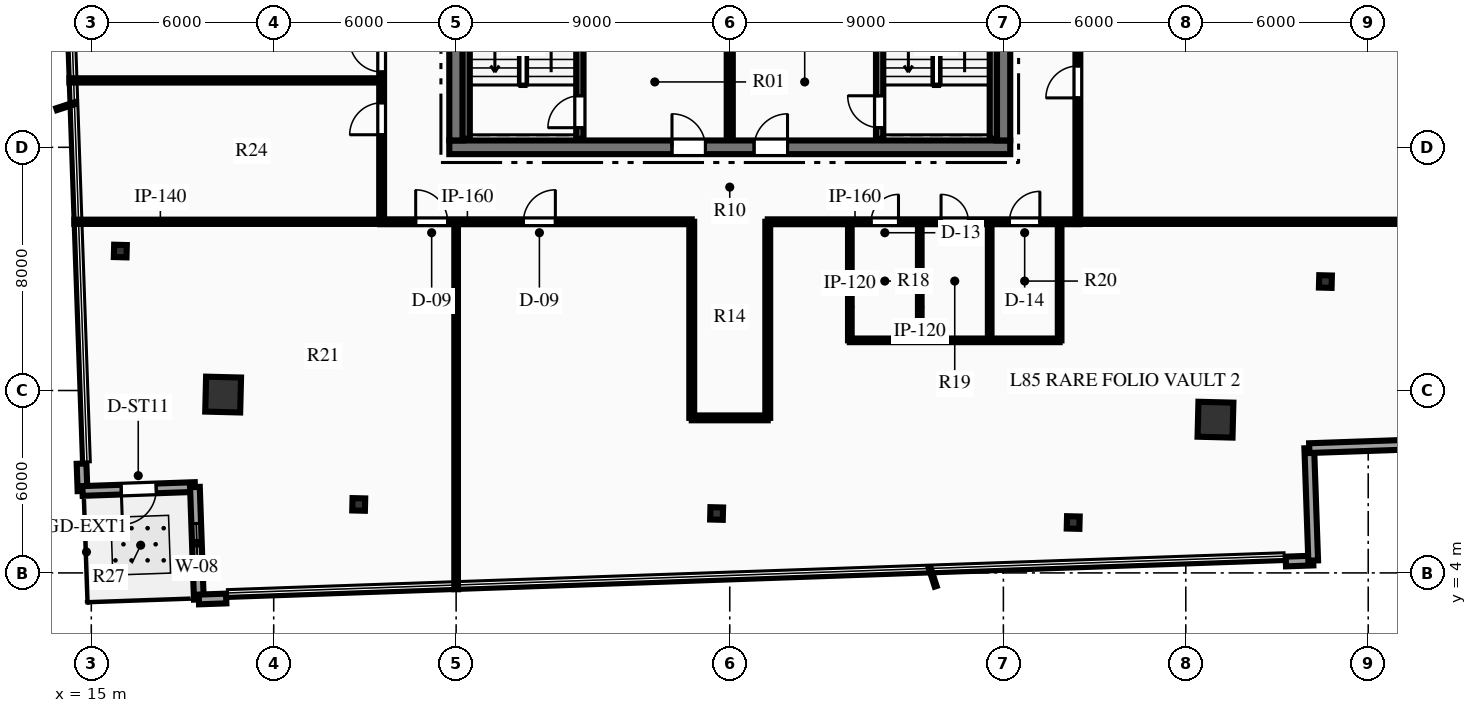
"""IFC4 building model, lengths in metres.
Left out: names, types, materials, properties, quantities, classifications, styles, units other than length and angle.
Written with IfcOpenShell. Run it as: python <this file> out.ifc"""

import sys

from ifc_helpers import new_model, si_unit, direction, frame, frame_2d, origin, origin_2d, place, context, subcontext, project, spatial, rectangle, hollow_rectangle, i_section, extrude, element, fill, save


model = new_model("IFC4")
c1 = context("Model", 3, precision=1e-05, world=origin(), true_north=direction((0.0, 1.0)))
c2 = subcontext(c1, "Body", "Model", "MODEL_VIEW")
j1 = project(units=[si_unit("LENGTHUNIT", "METRE"), si_unit("PLANEANGLEUNIT", "RADIAN")], contexts=[c1])
p1 = place(None, origin())
s1 = spatial("IfcSite", under=j1, at=p1, CompositionType="ELEMENT")
p2 = place(p1, origin())
s2 = spatial("IfcBuilding", under=s1, at=p2, CompositionType="ELEMENT")
p3 = place(p2, frame((0.0, 0.0, 336.45)))
s3 = spatial("IfcBuildingStorey", under=s2, at=p3, CompositionType="ELEMENT", Elevation=336.45)
p4 = place(p3, frame((26.775, 18.0, 0.0), z_axis=(0.0, 0.0, 1.0), x_axis=(1.0, 0.0, 0.0)))
e1 = element("IfcWall", 1, at=p4, inside=s3, PredefinedType="SHEAR", context=c2, shape_type="SweptSolid", body=[
    extrude(rectangle(XDim=18.45, YDim=0.45, at=frame_2d((9.225, 0.0))), origin(), (0.0, 0.0, 1.0), 3.75),
])
p5 = place(p4, frame((7.325, 0.0, 0.0)))
e2 = element("IfcOpeningElement", 2, at=p5, cuts=e1, PredefinedType="OPENING", context=c2, shape_type="SweptSolid", body=[
    extrude(rectangle(XDim=1.1, YDim=2.15, at=frame_2d((0.55, 1.075))), frame((0.0, 0.235, 0.0), z_axis=(0.0, -1.0, 0.0), x_axis=(1.0, 0.0, 0.0)), (0.0, 0.0, 1.0), 0.47),
])
p6 = place(p4, frame((10.025, 0.0, 0.0)))
e3 = element("IfcOpeningElement", 3, at=p6, cuts=e1, PredefinedType="OPENING", context=c2, shape_type="SweptSolid", body=[
    extrude(rectangle(XDim=1.1, YDim=2.15, at=frame_2d((0.55, 1.075))), frame((0.0, 0.235, 0.0), z_axis=(0.0, -1.0, 0.0), x_axis=(1.0, 0.0, 0.0)), (0.0, 0.0, 1.0), 0.47),
])
p7 = place(p3, frame((27.0, 18.225, 0.0), z_axis=(0.0, 0.0, 1.0), x_axis=(0.0, 1.0, 0.0)))
e4 = element("IfcWall", 4, at=p7, inside=s3, PredefinedType="SHEAR", context=c2, shape_type="SweptSolid", body=[
    extrude(rectangle(XDim=15.55, YDim=0.45, at=frame_2d((7.775, 0.0))), origin(), (0.0, 0.0, 1.0), 3.75),
])
p8 = place(p7, frame((10.015, 0.0, 0.0)))
e5 = element("IfcOpeningElement", 5, at=p8, cuts=e4, PredefinedType="OPENING", context=c2, shape_type="SweptSolid", body=[
    extrude(rectangle(XDim=1.4, YDim=2.2, at=frame_2d((0.7, 1.1))), frame((0.0, 0.235, 0.0), z_axis=(0.0, -1.0, 0.0), x_axis=(1.0, 0.0, 0.0)), (0.0, 0.0, 1.0), 0.47),
])
p9 = place(p3, frame((45.0, 18.225, 0.0), z_axis=(0.0, 0.0, 1.0), x_axis=(0.0, 1.0, 0.0)))
e6 = element("IfcWall", 6, at=p9, inside=s3, PredefinedType="SHEAR", context=c2, shape_type="SweptSolid", body=[
    extrude(rectangle(XDim=15.55, YDim=0.45, at=frame_2d((7.775, 0.0))), origin(), (0.0, 0.0, 1.0), 3.75),
])
p10 = place(p9, frame((10.015, 0.0, 0.0)))
e7 = element("IfcOpeningElement", 7, at=p10, cuts=e6, PredefinedType="OPENING", context=c2, shape_type="SweptSolid", body=[
    extrude(rectangle(XDim=1.4, YDim=2.2, at=frame_2d((0.7, 1.1))), frame((0.0, 0.235, 0.0), z_axis=(0.0, -1.0, 0.0), x_axis=(1.0, 0.0, 0.0)), (0.0, 0.0, 1.0), 0.47),
])
p11 = place(p3, frame((31.07, 18.28, 0.0), z_axis=(0.0, 0.0, 1.0), x_axis=(0.0, 1.0, 0.0)))
e8 = element("IfcWall", 8, at=p11, inside=s3, PredefinedType="SHEAR", context=c2, shape_type="SweptSolid", body=[
    extrude(rectangle(XDim=8.26, YDim=0.24, at=frame_2d((4.13, 0.0))), origin(), (0.0, 0.0, 1.0), 3.75),
])
p12 = place(p11, frame((0.365, 0.0, 0.0)))
e9 = element("IfcOpeningElement", 9, at=p12, cuts=e8, PredefinedType="OPENING", context=c2, shape_type="SweptSolid", body=[
    extrude(rectangle(XDim=1.05, YDim=2.15, at=frame_2d((0.525, 1.075))), frame((0.0, 0.13, 0.0), z_axis=(0.0, -1.0, 0.0), x_axis=(1.0, 0.0, 0.0)), (0.0, 0.0, 1.0), 0.26),
])
p13 = place(p3, frame((27.33, 18.28, 0.0), z_axis=(0.0, 0.0, 1.0), x_axis=(0.0, 1.0, 0.0)))
e10 = element("IfcWall", 10, at=p13, inside=s3, PredefinedType="SHEAR", context=c2, shape_type="SweptSolid", body=[
    extrude(rectangle(XDim=8.26, YDim=0.24, at=frame_2d((4.13, 0.0))), origin(), (0.0, 0.0, 1.0), 3.75),
])
p14 = place(p3, frame((40.93, 18.28, 0.0), z_axis=(0.0, 0.0, 1.0), x_axis=(0.0, 1.0, 0.0)))
e11 = element("IfcWall", 11, at=p14, inside=s3, PredefinedType="SHEAR", context=c2, shape_type="SweptSolid", body=[
    extrude(rectangle(XDim=8.26, YDim=0.24, at=frame_2d((4.13, 0.0))), origin(), (0.0, 0.0, 1.0), 3.75),
])
p15 = place(p14, frame((0.365, 0.0, 0.0)))
e12 = element("IfcOpeningElement", 12, at=p15, cuts=e11, PredefinedType="OPENING", context=c2, shape_type="SweptSolid", body=[
    extrude(rectangle(XDim=1.05, YDim=2.15, at=frame_2d((0.525, 1.075))), frame((0.0, 0.13, 0.0), z_axis=(0.0, -1.0, 0.0), x_axis=(1.0, 0.0, 0.0)), (0.0, 0.0, 1.0), 0.26),
])
p16 = place(p3, frame((44.67, 18.28, 0.0), z_axis=(0.0, 0.0, 1.0), x_axis=(0.0, 1.0, 0.0)))
e13 = element("IfcWall", 13, at=p16, inside=s3, PredefinedType="SHEAR", context=c2, shape_type="SweptSolid", body=[
    extrude(rectangle(XDim=8.26, YDim=0.24, at=frame_2d((4.13, 0.0))), origin(), (0.0, 0.0, 1.0), 3.75),
])
for number, where, z_axis, x_axis in (
    (14, (51.976, 9.04, 0.0), (0.0, 0.0, 1.0), (0.025, 1.0, 0.0)),
    (15, (19.336, 9.866, 0.0), (0.0, 0.0, 1.0), (0.025, 1.0, 0.0)),
):
    element("IfcColumn", number, at=place(p3, frame(where, z_axis=z_axis, x_axis=x_axis)), inside=s3, PredefinedType="COLUMN", context=c2, shape_type="SweptSolid", body=[
        extrude(hollow_rectangle(XDim=1.15, YDim=1.15, WallThickness=0.05, at=origin_2d()), origin(), (0.0, 0.0, 1.0), 3.75),
    ])
for number, where, z_axis, x_axis in (
    (16, (55.592, 13.584, 0.0), (0.0, 0.0, 1.0), (0.025, 1.0, 0.0)),
    (17, (15.955, 14.588, 0.0), (0.0, 0.0, 1.0), (0.025, 1.0, 0.0)),
    (18, (23.796, 6.252, 0.0), (0.0, 0.0, 1.0), (0.025, 1.0, 0.0)),
    (19, (35.568, 5.955, 0.0), (0.0, 0.0, 1.0), (0.025, 1.0, 0.0)),
    (20, (47.297, 5.658, 0.0), (0.0, 0.0, 1.0), (0.025, 1.0, 0.0)),
):
    element("IfcColumn", number, at=place(p3, frame(where, z_axis=z_axis, x_axis=x_axis)), inside=s3, PredefinedType="COLUMN", context=c2, shape_type="SweptSolid", body=[
        extrude(i_section(OverallWidth=0.406, OverallDepth=0.416, WebThickness=0.03, FlangeThickness=0.048, at=origin_2d()), origin(), (0.0, 0.0, 1.0), 3.75),
    ])
p17 = place(p3, frame((14.711, 6.695, 0.0), z_axis=(0.0, 0.0, 1.0), x_axis=(-0.034723889474, 0.999396943912, 0.0)))
e21 = element("IfcWall", 21, at=p17, inside=s3, PredefinedType="STANDARD", context=c2, shape_type="SweptSolid", body=[
    extrude(rectangle(XDim=0.9, YDim=0.32, at=frame_2d((0.45, 0.0))), origin(), (0.0, 0.0, 1.0), 3.49),
])
p18 = place(p3, frame((18.408, 6.824, 0.0), z_axis=(0.0, 0.0, 1.0), x_axis=(-0.999390619817, -0.034905429677, 0.0)))
e22 = element("IfcWall", 22, at=p18, inside=s3, PredefinedType="STANDARD", context=c2, shape_type="SweptSolid", body=[
    extrude(rectangle(XDim=3.7, YDim=0.32, at=frame_2d((1.85, 0.0))), origin(), (0.0, 0.0, 1.0), 3.49),
])
p19 = place(p18, frame((1.275, 0.0, 0.0)))
e23 = element("IfcOpeningElement", 23, at=p19, cuts=e22, PredefinedType="OPENING", context=c2, shape_type="SweptSolid", body=[
    extrude(rectangle(XDim=1.15, YDim=2.2, at=frame_2d((0.575, 1.1))), frame((0.0, 0.17, 0.0), z_axis=(0.0, -1.0, 0.0), x_axis=(1.0, 0.0, 0.0)), (0.0, 0.0, 1.0), 0.34),
])
p20 = place(p3, frame((18.538, 3.127, 0.0), z_axis=(0.0, 0.0, 1.0), x_axis=(-0.034905429677, 0.999390619817, 0.0)))
e24 = element("IfcWall", 24, at=p20, inside=s3, PredefinedType="STANDARD", context=c2, shape_type="SweptSolid", body=[
    extrude(rectangle(XDim=3.7, YDim=0.32, at=frame_2d((1.85, 0.0))), origin(), (0.0, 0.0, 1.0), 3.49),
])
p21 = place(p20, frame((1.2, 0.0, 0.85)))
e25 = element("IfcOpeningElement", 25, at=p21, cuts=e24, PredefinedType="OPENING", context=c2, shape_type="SweptSolid", body=[
    extrude(rectangle(XDim=1.3, YDim=1.9, at=frame_2d((0.65, 0.95))), frame((0.0, 0.17, 0.0), z_axis=(0.0, -1.0, 0.0), x_axis=(1.0, 0.0, 0.0)), (0.0, 0.0, 1.0), 0.34),
])
for number, where, z_axis, x_axis in (
    (26, (55.19, 4.406, 0.0), (0.0, 0.0, 1.0), (-0.999, -0.035, 0.0)),
    (27, (19.437, 3.158, 0.0), (0.0, 0.0, 1.0), (-0.999, -0.035, 0.0)),
):
    element("IfcWall", number, at=place(p3, frame(where, z_axis=z_axis, x_axis=x_axis)), inside=s3, PredefinedType="STANDARD", context=c2, shape_type="SweptSolid", body=[
        extrude(rectangle(XDim=0.9, YDim=0.32, at=frame_2d((0.45, 0.0))), origin(), (0.0, 0.0, 1.0), 3.49),
    ])
p22 = place(p3, frame((55.061, 8.104, 0.0), z_axis=(0.0, 0.0, 1.0), x_axis=(0.034839526044, -0.999392919439, 0.0)))
e28 = element("IfcWall", 28, at=p22, inside=s3, PredefinedType="STANDARD", context=c2, shape_type="SweptSolid", body=[
    extrude(rectangle(XDim=3.7, YDim=0.32, at=frame_2d((1.85, 0.0))), origin(), (0.0, 0.0, 1.0), 3.49),
])
p23 = place(p3, frame((58.759, 8.233, 0.0), z_axis=(0.0, 0.0, 1.0), x_axis=(-0.999390539416, -0.034907731618, 0.0)))
e29 = element("IfcWall", 29, at=p23, inside=s3, PredefinedType="STANDARD", context=c2, shape_type="SweptSolid", body=[
    extrude(rectangle(XDim=3.7, YDim=0.32, at=frame_2d((1.85, 0.0))), origin(), (0.0, 0.0, 1.0), 3.49),
])
p24 = place(p3, frame((36.0, 18.28, 0.0), z_axis=(0.0, 0.0, 1.0), x_axis=(0.0, 1.0, 0.0)))
e30 = element("IfcWall", 30, at=p24, inside=s3, PredefinedType="PARTITIONING", context=c2, shape_type="SweptSolid", body=[
    extrude(rectangle(XDim=3.77, YDim=0.2, at=frame_2d((1.885, 0.0))), origin(), (0.0, 0.0, 1.0), 3.49),
])
p25 = place(p3, frame((24.5, 15.55, 0.0), z_axis=(0.0, 0.0, 1.0), x_axis=(1.0, 0.0, 0.0)))
e31 = element("IfcWall", 31, at=p25, inside=s3, PredefinedType="PARTITIONING", context=c2, shape_type="SweptSolid", body=[
    extrude(rectangle(XDim=10.25, YDim=0.16, at=frame_2d((5.125, 0.0))), origin(), (0.0, 0.0, 1.0), 3.49),
])
p26 = place(p25, frame((1.17, 0.0, 0.0)))
e32 = element("IfcOpeningElement", 32, at=p26, cuts=e31, PredefinedType="OPENING", context=c2, shape_type="SweptSolid", body=[
    extrude(rectangle(XDim=1.05, YDim=2.15, at=frame_2d((0.525, 1.075))), frame((0.0, 0.09, 0.0), z_axis=(0.0, -1.0, 0.0), x_axis=(1.0, 0.0, 0.0)), (0.0, 0.0, 1.0), 0.18),
])
p27 = place(p25, frame((4.714, 0.0, 0.0)))
e33 = element("IfcOpeningElement", 33, at=p27, cuts=e31, PredefinedType="OPENING", context=c2, shape_type="SweptSolid", body=[
    extrude(rectangle(XDim=1.05, YDim=2.15, at=frame_2d((0.525, 1.075))), frame((0.0, 0.09, 0.0), z_axis=(0.0, -1.0, 0.0), x_axis=(1.0, 0.0, 0.0)), (0.0, 0.0, 1.0), 0.18),
])
p28 = place(p3, frame((37.25, 15.55, 0.0), z_axis=(0.0, 0.0, 1.0), x_axis=(1.0, 0.0, 0.0)))
e34 = element("IfcWall", 34, at=p28, inside=s3, PredefinedType="PARTITIONING", context=c2, shape_type="SweptSolid", body=[
    extrude(rectangle(XDim=10.25, YDim=0.16, at=frame_2d((5.125, 0.0))), origin(), (0.0, 0.0, 1.0), 3.49),
])
p29 = place(p28, frame((3.4, 0.0, 0.0)))
e35 = element("IfcOpeningElement", 35, at=p29, cuts=e34, PredefinedType="OPENING", context=c2, shape_type="SweptSolid", body=[
    extrude(rectangle(XDim=0.9, YDim=2.15, at=frame_2d((0.45, 1.075))), frame((0.0, 0.09, 0.0), z_axis=(0.0, -1.0, 0.0), x_axis=(1.0, 0.0, 0.0)), (0.0, 0.0, 1.0), 0.18),
])
p30 = place(p28, frame((5.7, 0.0, 0.0)))
e36 = element("IfcOpeningElement", 36, at=p30, cuts=e34, PredefinedType="OPENING", context=c2, shape_type="SweptSolid", body=[
    extrude(rectangle(XDim=0.9, YDim=2.15, at=frame_2d((0.45, 1.075))), frame((0.0, 0.09, 0.0), z_axis=(0.0, -1.0, 0.0), x_axis=(1.0, 0.0, 0.0)), (0.0, 0.0, 1.0), 0.18),
])
p31 = place(p28, frame((7.95, 0.0, 0.0)))
e37 = element("IfcOpeningElement", 37, at=p31, cuts=e34, PredefinedType="OPENING", context=c2, shape_type="SweptSolid", body=[
    extrude(rectangle(XDim=1.0, YDim=2.15, at=frame_2d((0.5, 1.075))), frame((0.0, 0.09, 0.0), z_axis=(0.0, -1.0, 0.0), x_axis=(1.0, 0.0, 0.0)), (0.0, 0.0, 1.0), 0.18),
])
p32 = place(p3, frame((24.55, 15.55, 0.0), z_axis=(0.0, 0.0, 1.0), x_axis=(0.0, 1.0, 0.0)))
e38 = element("IfcWall", 38, at=p32, inside=s3, PredefinedType="PARTITIONING", context=c2, shape_type="SweptSolid", body=[
    extrude(rectangle(XDim=9.2, YDim=0.16, at=frame_2d((4.6, 0.0))), origin(), (0.0, 0.0, 1.0), 3.49),
])
p33 = place(p32, frame((2.863, 0.0, 0.0)))
e39 = element("IfcOpeningElement", 39, at=p33, cuts=e38, PredefinedType="OPENING", context=c2, shape_type="SweptSolid", body=[
    extrude(rectangle(XDim=1.05, YDim=2.15, at=frame_2d((0.525, 1.075))), frame((0.0, 0.09, 0.0), z_axis=(0.0, -1.0, 0.0), x_axis=(1.0, 0.0, 0.0)), (0.0, 0.0, 1.0), 0.18),
])
p34 = place(p32, frame((4.93, 0.0, 0.0)))
e40 = element("IfcOpeningElement", 40, at=p34, cuts=e38, PredefinedType="OPENING", context=c2, shape_type="SweptSolid", body=[
    extrude(rectangle(XDim=1.05, YDim=2.15, at=frame_2d((0.525, 1.075))), frame((0.0, 0.09, 0.0), z_axis=(0.0, -1.0, 0.0), x_axis=(1.0, 0.0, 0.0)), (0.0, 0.0, 1.0), 0.18),
])
p35 = place(p3, frame((47.45, 15.55, 0.0), z_axis=(0.0, 0.0, 1.0), x_axis=(0.0, 1.0, 0.0)))
e41 = element("IfcWall", 41, at=p35, inside=s3, PredefinedType="PARTITIONING", context=c2, shape_type="SweptSolid", body=[
    extrude(rectangle(XDim=9.2, YDim=0.16, at=frame_2d((4.6, 0.0))), origin(), (0.0, 0.0, 1.0), 3.49),
])
p36 = place(p35, frame((4.075, 0.0, 0.0)))
e42 = element("IfcOpeningElement", 42, at=p36, cuts=e41, PredefinedType="OPENING", context=c2, shape_type="SweptSolid", body=[
    extrude(rectangle(XDim=1.05, YDim=2.15, at=frame_2d((0.525, 1.075))), frame((0.0, 0.09, 0.0), z_axis=(0.0, -1.0, 0.0), x_axis=(1.0, 0.0, 0.0)), (0.0, 0.0, 1.0), 0.18),
])
for number, where, z_axis, x_axis in (
    (43, (34.75, 9.1, 0.0), (0.0, 0.0, 1.0), (0.0, 1.0, 0.0)),
    (44, (37.25, 9.1, 0.0), (0.0, 0.0, 1.0), (0.0, 1.0, 0.0)),
):
    element("IfcWall", number, at=place(p3, frame(where, z_axis=z_axis, x_axis=x_axis)), inside=s3, PredefinedType="PARTITIONING", context=c2, shape_type="SweptSolid", body=[
        extrude(rectangle(XDim=6.45, YDim=0.16, at=frame_2d((3.225, 0.0))), origin(), (0.0, 0.0, 1.0), 3.49),
    ])
p37 = place(p3, frame((34.75, 9.1, 0.0), z_axis=(0.0, 0.0, 1.0), x_axis=(1.0, 0.0, 0.0)))
e45 = element("IfcWall", 45, at=p37, inside=s3, PredefinedType="PARTITIONING", context=c2, shape_type="SweptSolid", body=[
    extrude(rectangle(XDim=2.5, YDim=0.16, at=frame_2d((1.25, 0.0))), origin(), (0.0, 0.0, 1.0), 3.49),
])
for number, where, z_axis, x_axis in (
    (46, (39.95, 11.65, 0.0), (0.0, 0.0, 1.0), (0.0, 1.0, 0.0)),
    (47, (42.25, 11.65, 0.0), (0.0, 0.0, 1.0), (0.0, 1.0, 0.0)),
    (48, (44.55, 11.65, 0.0), (0.0, 0.0, 1.0), (0.0, 1.0, 0.0)),
    (49, (46.85, 11.65, 0.0), (0.0, 0.0, 1.0), (0.0, 1.0, 0.0)),
):
    element("IfcWall", number, at=place(p3, frame(where, z_axis=z_axis, x_axis=x_axis)), inside=s3, PredefinedType="PARTITIONING", context=c2, shape_type="SweptSolid", body=[
        extrude(rectangle(XDim=3.9, YDim=0.12, at=frame_2d((1.95, 0.0))), origin(), (0.0, 0.0, 1.0), 3.49),
    ])
p38 = place(p3, frame((39.95, 11.65, 0.0), z_axis=(0.0, 0.0, 1.0), x_axis=(1.0, 0.0, 0.0)))
e50 = element("IfcWall", 50, at=p38, inside=s3, PredefinedType="PARTITIONING", context=c2, shape_type="SweptSolid", body=[
    extrude(rectangle(XDim=6.9, YDim=0.12, at=frame_2d((3.45, 0.0))), origin(), (0.0, 0.0, 1.0), 3.49),
])
p39 = place(p3, frame((14.442, 15.55, 0.0), z_axis=(0.0, 0.0, 1.0), x_axis=(1.0, 0.0, 0.0)))
e51 = element("IfcWall", 51, at=p39, inside=s3, PredefinedType="PARTITIONING", context=c2, shape_type="SweptSolid", body=[
    extrude(rectangle(XDim=10.108, YDim=0.14, at=frame_2d((5.054, 0.0))), origin(), (0.0, 0.0, 1.0), 2.868),
])
p40 = place(p3, frame((47.45, 15.55, 0.0), z_axis=(0.0, 0.0, 1.0), x_axis=(1.0, 0.0, 0.0)))
e52 = element("IfcWall", 52, at=p40, inside=s3, PredefinedType="PARTITIONING", context=c2, shape_type="SweptSolid", body=[
    extrude(rectangle(XDim=11.013, YDim=0.14, at=frame_2d((5.507, 0.0))), origin(), (0.0, 0.0, 1.0), 2.868),
])
p41 = place(p3, frame((27.0, 3.462, 0.0), z_axis=(0.0, 0.0, 1.0), x_axis=(0.0, 1.0, 0.0)))
e53 = element("IfcWall", 53, at=p41, inside=s3, PredefinedType="PARTITIONING", context=c2, shape_type="SweptSolid", body=[
    extrude(rectangle(XDim=12.088, YDim=0.12, at=frame_2d((6.044, 0.0))), origin(), (0.0, 0.0, 1.0), 3.49),
])
p42 = place(p3, frame((14.279, 20.2, 0.0), z_axis=(0.0, 0.0, 1.0), x_axis=(1.0, 0.0, 0.0)))
e54 = element("IfcWall", 54, at=p42, inside=s3, PredefinedType="PARTITIONING", context=c2, shape_type="SweptSolid", body=[
    extrude(rectangle(XDim=10.271, YDim=0.14, at=frame_2d((5.135, 0.0))), origin(), (0.0, 0.0, 1.0), 3.49),
])
p43 = place(p19, origin())
e55 = element("IfcDoor", 55, at=p43, inside=s3, OperationType="SINGLE_SWING_RIGHT", PredefinedType="DOOR", context=c2, shape_type="SweptSolid", body=[
    extrude(rectangle(XDim=1.15, YDim=2.2, at=frame_2d((0.575, 1.1))), frame((0.0, 0.025, 0.0), z_axis=(0.0, -1.0, 0.0), x_axis=(1.0, 0.0, 0.0)), (0.0, 0.0, 1.0), 0.05),
])
fill(e23, e55)
p44 = place(p21, origin())
e56 = element("IfcWindow", 56, at=p44, inside=s3, PartitioningType="SINGLE_PANEL", PredefinedType="WINDOW", context=c2, shape_type="SweptSolid", body=[
    extrude(rectangle(XDim=1.3, YDim=1.9, at=frame_2d((0.65, 0.95))), frame((0.0, 0.03, 0.0), z_axis=(0.0, -1.0, 0.0), x_axis=(1.0, 0.0, 0.0)), (0.0, 0.0, 1.0), 0.06),
])
fill(e25, e56)
p45 = place(p12, origin())
e57 = element("IfcDoor", 57, at=p45, inside=s3, OperationType="SINGLE_SWING_LEFT", PredefinedType="DOOR", context=c2, shape_type="SweptSolid", body=[
    extrude(rectangle(XDim=1.05, YDim=2.15, at=frame_2d((0.525, 1.075))), frame((0.0, 0.025, 0.0), z_axis=(0.0, -1.0, 0.0), x_axis=(1.0, 0.0, 0.0)), (0.0, 0.0, 1.0), 0.05),
])
fill(e9, e57)
p46 = place(p15, origin())
e58 = element("IfcDoor", 58, at=p46, inside=s3, OperationType="SINGLE_SWING_RIGHT", PredefinedType="DOOR", context=c2, shape_type="SweptSolid", body=[
    extrude(rectangle(XDim=1.05, YDim=2.15, at=frame_2d((0.525, 1.075))), frame((0.0, 0.025, 0.0), z_axis=(0.0, -1.0, 0.0), x_axis=(1.0, 0.0, 0.0)), (0.0, 0.0, 1.0), 0.05),
])
fill(e12, e58)
p47 = place(p5, origin())
e59 = element("IfcDoor", 59, at=p47, inside=s3, OperationType="SINGLE_SWING_LEFT", PredefinedType="DOOR", context=c2, shape_type="SweptSolid", body=[
    extrude(rectangle(XDim=1.1, YDim=2.15, at=frame_2d((0.55, 1.075))), frame((0.0, 0.025, 0.0), z_axis=(0.0, -1.0, 0.0), x_axis=(1.0, 0.0, 0.0)), (0.0, 0.0, 1.0), 0.05),
])
fill(e2, e59)
p48 = place(p6, origin())
e60 = element("IfcDoor", 60, at=p48, inside=s3, OperationType="SINGLE_SWING_RIGHT", PredefinedType="DOOR", context=c2, shape_type="SweptSolid", body=[
    extrude(rectangle(XDim=1.1, YDim=2.15, at=frame_2d((0.55, 1.075))), frame((0.0, 0.025, 0.0), z_axis=(0.0, -1.0, 0.0), x_axis=(1.0, 0.0, 0.0)), (0.0, 0.0, 1.0), 0.05),
])
fill(e3, e60)
p49 = place(p29, origin())
e61 = element("IfcDoor", 61, at=p49, inside=s3, OperationType="SINGLE_SWING_RIGHT", PredefinedType="DOOR", context=c2, shape_type="SweptSolid", body=[
    extrude(rectangle(XDim=0.9, YDim=2.15, at=frame_2d((0.45, 1.075))), frame((0.0, 0.025, 0.0), z_axis=(0.0, -1.0, 0.0), x_axis=(1.0, 0.0, 0.0)), (0.0, 0.0, 1.0), 0.05),
])
fill(e35, e61)
p50 = place(p30, origin())
e62 = element("IfcDoor", 62, at=p50, inside=s3, OperationType="SINGLE_SWING_LEFT", PredefinedType="DOOR", context=c2, shape_type="SweptSolid", body=[
    extrude(rectangle(XDim=0.9, YDim=2.15, at=frame_2d((0.45, 1.075))), frame((0.0, 0.025, 0.0), z_axis=(0.0, -1.0, 0.0), x_axis=(1.0, 0.0, 0.0)), (0.0, 0.0, 1.0), 0.05),
])
fill(e36, e62)
p51 = place(p31, origin())
e63 = element("IfcDoor", 63, at=p51, inside=s3, OperationType="SINGLE_SWING_RIGHT", PredefinedType="DOOR", context=c2, shape_type="SweptSolid", body=[
    extrude(rectangle(XDim=1.0, YDim=2.15, at=frame_2d((0.5, 1.075))), frame((0.0, 0.025, 0.0), z_axis=(0.0, -1.0, 0.0), x_axis=(1.0, 0.0, 0.0)), (0.0, 0.0, 1.0), 0.05),
])
fill(e37, e63)
p52 = place(p26, origin())
e64 = element("IfcDoor", 64, at=p52, inside=s3, OperationType="SINGLE_SWING_LEFT", PredefinedType="DOOR", context=c2, shape_type="SweptSolid", body=[
    extrude(rectangle(XDim=1.05, YDim=2.15, at=frame_2d((0.525, 1.075))), frame((0.0, 0.025, 0.0), z_axis=(0.0, -1.0, 0.0), x_axis=(1.0, 0.0, 0.0)), (0.0, 0.0, 1.0), 0.05),
])
fill(e32, e64)
p53 = place(p27, origin())
e65 = element("IfcDoor", 65, at=p53, inside=s3, OperationType="SINGLE_SWING_RIGHT", PredefinedType="DOOR", context=c2, shape_type="SweptSolid", body=[
    extrude(rectangle(XDim=1.05, YDim=2.15, at=frame_2d((0.525, 1.075))), frame((0.0, 0.025, 0.0), z_axis=(0.0, -1.0, 0.0), x_axis=(1.0, 0.0, 0.0)), (0.0, 0.0, 1.0), 0.05),
])
fill(e33, e65)
p54 = place(p33, origin())
e66 = element("IfcDoor", 66, at=p54, inside=s3, OperationType="SINGLE_SWING_LEFT", PredefinedType="DOOR", context=c2, shape_type="SweptSolid", body=[
    extrude(rectangle(XDim=1.05, YDim=2.15, at=frame_2d((0.525, 1.075))), frame((0.0, 0.025, 0.0), z_axis=(0.0, -1.0, 0.0), x_axis=(1.0, 0.0, 0.0)), (0.0, 0.0, 1.0), 0.05),
])
fill(e39, e66)
p55 = place(p34, origin())
e67 = element("IfcDoor", 67, at=p55, inside=s3, OperationType="SINGLE_SWING_RIGHT", PredefinedType="DOOR", context=c2, shape_type="SweptSolid", body=[
    extrude(rectangle(XDim=1.05, YDim=2.15, at=frame_2d((0.525, 1.075))), frame((0.0, 0.025, 0.0), z_axis=(0.0, -1.0, 0.0), x_axis=(1.0, 0.0, 0.0)), (0.0, 0.0, 1.0), 0.05),
])
fill(e40, e67)
p56 = place(p36, origin())
e68 = element("IfcDoor", 68, at=p56, inside=s3, OperationType="SINGLE_SWING_LEFT", PredefinedType="DOOR", context=c2, shape_type="SweptSolid", body=[
    extrude(rectangle(XDim=1.05, YDim=2.15, at=frame_2d((0.525, 1.075))), frame((0.0, 0.025, 0.0), z_axis=(0.0, -1.0, 0.0), x_axis=(1.0, 0.0, 0.0)), (0.0, 0.0, 1.0), 0.05),
])
fill(e42, e68)
save(model, sys.argv[1])
